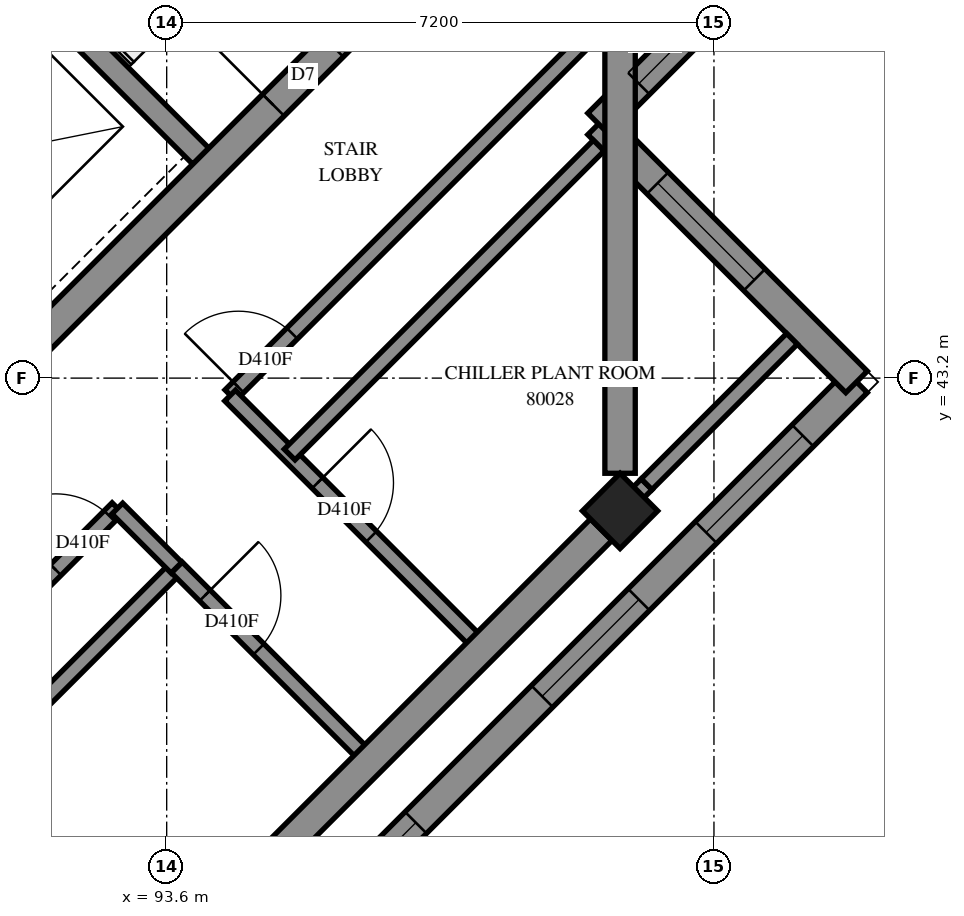
"""IFC4 building model, lengths in metres.
Left out: names, types, materials, properties, quantities, classifications, styles, units other than length and angle.
Written with IfcOpenShell. Run it as: python <this file> out.ifc"""

import sys

from ifc_helpers import new_model, si_unit, direction, frame, frame_2d, origin, origin_2d, place, context, subcontext, project, spatial, polyline, rectangle, outline, extrude, element, fill, save


model = new_model("IFC4")
c1 = context("Model", 3, precision=1e-05, world=origin(), true_north=direction((0.0, 1.0)))
c2 = subcontext(c1, "Body", "Model", "MODEL_VIEW")
j1 = project(units=[si_unit("LENGTHUNIT", "METRE"), si_unit("PLANEANGLEUNIT", "RADIAN")], contexts=[c1])
p1 = place(None, origin())
s1 = spatial("IfcSite", under=j1, at=p1, CompositionType="ELEMENT")
p2 = place(p1, origin())
s2 = spatial("IfcBuilding", under=s1, at=p2, CompositionType="ELEMENT")
p3 = place(p2, frame((0.0, 0.0, 294.4)))
s3 = spatial("IfcBuildingStorey", under=s2, at=p3, CompositionType="ELEMENT", Elevation=294.4)
p4 = place(p3, frame((99.565, 41.453, 0.0), z_axis=(0.0, 0.0, 1.0), x_axis=(0.7071067812, -0.7071067812, 0.0)))
e1 = element("IfcColumn", 1, at=p4, inside=s3, PredefinedType="COLUMN", context=c2, shape_type="SweptSolid", body=[
    extrude(rectangle(XDim=0.7, YDim=0.7, at=origin_2d()), origin(), (0.0, 0.0, 1.0), 3.5),
])
p5 = place(p3, frame((86.978, 38.766, -0.3), z_axis=(0.0, 0.0, 1.0), x_axis=(0.7071067812, 0.7071067812, 0.0)))
e2 = element("IfcWall", 2, at=p5, inside=s3, PredefinedType="SHEAR", context=c2, shape_type="SweptSolid", body=[
    extrude(outline(polyline([(0.0, 0.0), (14.4, 0.0), (14.4, 3.1), (0.0, 3.1), (0.0, 0.0)])), frame((0.0, 0.2, 0.0), z_axis=(0.0, -1.0, 0.0), x_axis=(1.0, 0.0, 0.0)), (0.0, 0.0, 1.0), 0.4),
])
p6 = place(p5, frame((4.55, 0.0, 0.3)))
e3 = element("IfcOpeningElement", 3, at=p6, cuts=e2, PredefinedType="OPENING", context=c2, shape_type="SweptSolid", body=[
    extrude(rectangle(XDim=1.1, YDim=2.1, at=frame_2d((0.55, 1.05))), frame((0.0, 0.21, 0.0), z_axis=(0.0, -1.0, 0.0), x_axis=(1.0, 0.0, 0.0)), (0.0, 0.0, 1.0), 0.42),
])
p7 = place(p5, frame((11.35, 0.0, 0.3)))
e4 = element("IfcOpeningElement", 4, at=p7, cuts=e2, PredefinedType="OPENING", context=c2, shape_type="SweptSolid", body=[
    extrude(rectangle(XDim=1.1, YDim=2.1, at=frame_2d((0.55, 1.05))), frame((0.0, 0.21, 0.0), z_axis=(0.0, -1.0, 0.0), x_axis=(1.0, 0.0, 0.0)), (0.0, 0.0, 1.0), 0.42),
])
p8 = place(p3, frame((88.958, 51.211, 0.0), z_axis=(0.0, 0.0, 1.0), x_axis=(0.7070998367, -0.7071137256, 0.0)))
e5 = element("IfcWall", 5, at=p8, inside=s3, PredefinedType="SOLIDWALL", context=c2, shape_type="SweptSolid", body=[
    extrude(outline(polyline([(0.0, 0.0), (7.2, 0.0), (7.2, 3.5), (0.0, 3.5), (0.0, 0.0)])), frame((0.0, 0.15, 0.0), z_axis=(0.0, -1.0, 0.0), x_axis=(1.0, 0.0, 0.0)), (0.0, 0.0, 1.0), 0.3),
])
p9 = place(p3, frame((89.382, 29.856, 0.0), z_axis=(0.0, 0.0, 1.0), x_axis=(0.7071094407, 0.7071041216, 0.0)))
e6 = element("IfcWall", 6, at=p9, inside=s3, PredefinedType="SOLIDWALL", context=c2, shape_type="SweptSolid", body=[
    extrude(outline(polyline([(-0.2, -0.2), (19.0, -0.2), (18.6, 0.2), (0.2, 0.2), (-0.2, -0.2)])), origin(), (0.0, 0.0, 1.0), 3.5),
])
p10 = place(p9, frame((1.9, 0.0, 0.7)))
e7 = element("IfcOpeningElement", 7, at=p10, cuts=e6, PredefinedType="OPENING", context=c2, shape_type="SweptSolid", body=[
    extrude(rectangle(XDim=1.8, YDim=2.2, at=frame_2d((0.9, 1.1))), frame((0.0, 0.21, 0.0), z_axis=(0.0, -1.0, 0.0), x_axis=(1.0, 0.0, 0.0)), (0.0, 0.0, 1.0), 0.42),
])
p11 = place(p9, frame((5.5, 0.0, 0.7)))
e8 = element("IfcOpeningElement", 8, at=p11, cuts=e6, PredefinedType="OPENING", context=c2, shape_type="SweptSolid", body=[
    extrude(rectangle(XDim=1.8, YDim=2.2, at=frame_2d((0.9, 1.1))), frame((0.0, 0.21, 0.0), z_axis=(0.0, -1.0, 0.0), x_axis=(1.0, 0.0, 0.0)), (0.0, 0.0, 1.0), 0.42),
])
p12 = place(p9, frame((8.8, 0.0, 0.7)))
e9 = element("IfcOpeningElement", 9, at=p12, cuts=e6, PredefinedType="OPENING", context=c2, shape_type="SweptSolid", body=[
    extrude(rectangle(XDim=1.8, YDim=2.2, at=frame_2d((0.9, 1.1))), frame((0.0, 0.21, 0.0), z_axis=(0.0, -1.0, 0.0), x_axis=(1.0, 0.0, 0.0)), (0.0, 0.0, 1.0), 0.42),
])
p13 = place(p9, frame((12.95, 0.0, 0.7)))
e10 = element("IfcOpeningElement", 10, at=p13, cuts=e6, PredefinedType="OPENING", context=c2, shape_type="SweptSolid", body=[
    extrude(rectangle(XDim=1.8, YDim=2.2, at=frame_2d((0.9, 1.1))), frame((0.0, 0.21, 0.0), z_axis=(0.0, -1.0, 0.0), x_axis=(1.0, 0.0, 0.0)), (0.0, 0.0, 1.0), 0.42),
])
p14 = place(p9, frame((16.0, 0.0, 0.7)))
e11 = element("IfcOpeningElement", 11, at=p14, cuts=e6, PredefinedType="OPENING", context=c2, shape_type="SweptSolid", body=[
    extrude(rectangle(XDim=1.8, YDim=2.2, at=frame_2d((0.9, 1.1))), frame((0.0, 0.21, 0.0), z_axis=(0.0, -1.0, 0.0), x_axis=(1.0, 0.0, 0.0)), (0.0, 0.0, 1.0), 0.42),
])
p15 = place(p3, frame((102.676, 43.15, 0.0), z_axis=(0.0, 0.0, 1.0), x_axis=(-0.7070963646, 0.7071171977, 0.0)))
e12 = element("IfcWall", 12, at=p15, inside=s3, PredefinedType="SOLIDWALL", context=c2, shape_type="SweptSolid", body=[
    extrude(outline(polyline([(-0.2, -0.2), (4.6, -0.2), (5.0, 0.2), (0.2, 0.2), (-0.2, -0.2)])), origin(), (0.0, 0.0, 1.0), 3.5),
])
p16 = place(p15, frame((1.9, 0.0, 0.7)))
e13 = element("IfcOpeningElement", 13, at=p16, cuts=e12, PredefinedType="OPENING", context=c2, shape_type="SweptSolid", body=[
    extrude(rectangle(XDim=1.8, YDim=2.2, at=frame_2d((0.9, 1.1))), frame((0.0, 0.21, 0.0), z_axis=(0.0, -1.0, 0.0), x_axis=(1.0, 0.0, 0.0)), (0.0, 0.0, 1.0), 0.42),
])
p17 = place(p3, frame((99.282, 46.544, 0.0), z_axis=(0.0, 0.0, 1.0), x_axis=(0.7071067812, 0.7071067812, 0.0)))
e14 = element("IfcWall", 14, at=p17, inside=s3, PredefinedType="SOLIDWALL", context=c2, shape_type="SweptSolid", body=[
    extrude(outline(polyline([(0.2, -0.2), (6.23, -0.2), (5.657, 0.2), (-0.2, 0.2), (0.2, -0.2)])), origin(), (0.0, 0.0, 1.0), 3.5),
])
p18 = place(p17, frame((0.75, 0.0, 0.7)))
e15 = element("IfcOpeningElement", 15, at=p18, cuts=e14, PredefinedType="OPENING", context=c2, shape_type="SweptSolid", body=[
    extrude(rectangle(XDim=1.8, YDim=2.2, at=frame_2d((0.9, 1.1))), frame((0.0, 0.21, 0.0), z_axis=(0.0, -1.0, 0.0), x_axis=(1.0, 0.0, 0.0)), (0.0, 0.0, 1.0), 0.42),
])
p19 = place(p3, frame((93.908, 34.665, 0.0), z_axis=(0.0, 0.0, 1.0), x_axis=(-0.7071067812, 0.7071067812, 0.0)))
e16 = element("IfcWall", 16, at=p19, inside=s3, PredefinedType="PARAPET", context=c2, shape_type="SweptSolid", body=[
    extrude(outline(polyline([(0.0, -0.1), (7.3, -0.1), (7.3, 0.1), (0.0, 0.1), (0.0, -0.1)])), origin(), (0.0, 0.0, 1.0), 0.25),
])
p20 = place(p3, frame((86.836, 35.372, 0.0), z_axis=(0.0, 0.0, 1.0), x_axis=(0.7071067812, 0.7071067812, 0.0)))
e17 = element("IfcWall", 17, at=p20, inside=s3, PredefinedType="PARTITIONING", context=c2, shape_type="SweptSolid", body=[
    extrude(rectangle(XDim=8.651, YDim=0.2, at=frame_2d((4.325, 0.0))), origin(), (0.0, 0.0, 1.0), 3.5),
])
p21 = place(p20, frame((7.502, 0.0, 0.0)))
e18 = element("IfcOpeningElement", 18, at=p21, cuts=e17, PredefinedType="OPENING", context=c2, shape_type="SweptSolid", body=[
    extrude(rectangle(XDim=1.0, YDim=2.1, at=frame_2d((0.5, 1.05))), frame((0.0, 0.11, 0.0), z_axis=(0.0, -1.0, 0.0), x_axis=(1.0, 0.0, 0.0)), (0.0, 0.0, 1.0), 0.22),
])
p22 = place(p3, frame((94.438, 42.974, 0.0), z_axis=(0.0, 0.0, 1.0), x_axis=(0.7071067812, 0.7071067812, 0.0)))
e19 = element("IfcWall", 19, at=p22, inside=s3, PredefinedType="PARTITIONING", context=c2, shape_type="SweptSolid", body=[
    extrude(rectangle(XDim=8.649, YDim=0.2, at=frame_2d((4.325, 0.0))), origin(), (0.0, 0.0, 1.0), 3.5),
])
p23 = place(p22, frame((0.15, 0.0, 0.0)))
e20 = element("IfcOpeningElement", 20, at=p23, cuts=e19, PredefinedType="OPENING", context=c2, shape_type="SweptSolid", body=[
    extrude(rectangle(XDim=1.0, YDim=2.1, at=frame_2d((0.5, 1.05))), frame((0.0, 0.11, 0.0), z_axis=(0.0, -1.0, 0.0), x_axis=(1.0, 0.0, 0.0)), (0.0, 0.0, 1.0), 0.22),
])
p24 = place(p3, frame((89.876, 36.858, 0.0), z_axis=(0.0, 0.0, 1.0), x_axis=(0.7071067812, 0.7071067812, 0.0)))
e21 = element("IfcWall", 21, at=p24, inside=s3, PredefinedType="PARTITIONING", context=c2, shape_type="SweptSolid", body=[
    extrude(rectangle(XDim=5.45, YDim=0.2, at=frame_2d((2.725, 0.0))), origin(), (0.0, 0.0, 1.0), 3.5),
])
p25 = place(p3, frame((94.434, 42.971, 0.0), z_axis=(0.0, 0.0, 1.0), x_axis=(0.7071067812, -0.7071067812, 0.0)))
e22 = element("IfcWall", 22, at=p25, inside=s3, PredefinedType="PARTITIONING", context=c2, shape_type="SweptSolid", body=[
    extrude(rectangle(XDim=4.701, YDim=0.2, at=frame_2d((2.35, 0.0))), origin(), (0.0, 0.0, 1.0), 3.5),
])
p26 = place(p25, frame((1.626, 0.0, 0.0)))
e23 = element("IfcOpeningElement", 23, at=p26, cuts=e22, PredefinedType="OPENING", context=c2, shape_type="SweptSolid", body=[
    extrude(rectangle(XDim=1.0, YDim=2.1, at=frame_2d((0.5, 1.05))), frame((0.0, 0.11, 0.0), z_axis=(0.0, -1.0, 0.0), x_axis=(1.0, 0.0, 0.0)), (0.0, 0.0, 1.0), 0.22),
])
p27 = place(p3, frame((93.732, 40.71, 0.0), z_axis=(0.0, 0.0, 1.0), x_axis=(0.7068288851, -0.7073845681, 0.0)))
e24 = element("IfcWall", 24, at=p27, inside=s3, PredefinedType="PARTITIONING", context=c2, shape_type="SweptSolid", body=[
    extrude(rectangle(XDim=3.599, YDim=0.2, at=frame_2d((1.8, 0.0))), origin(), (0.0, 0.0, 1.0), 3.5),
])
p28 = place(p27, frame((0.524, 0.0, 0.0)))
e25 = element("IfcOpeningElement", 25, at=p28, cuts=e24, PredefinedType="OPENING", context=c2, shape_type="SweptSolid", body=[
    extrude(rectangle(XDim=1.0, YDim=2.1, at=frame_2d((0.5, 1.05))), frame((0.0, 0.11, 0.0), z_axis=(0.0, -1.0, 0.0), x_axis=(1.0, 0.0, 0.0)), (0.0, 0.0, 1.0), 0.22),
])
p29 = place(p3, frame((96.275, 38.165, 0.0), z_axis=(0.0, 0.0, 1.0), x_axis=(0.7071067812, 0.7071067812, 0.0)))
e26 = element("IfcWall", 26, at=p29, inside=s3, PredefinedType="PARTITIONING", context=c2, shape_type="SweptSolid", body=[
    extrude(rectangle(XDim=2.102, YDim=0.2, at=frame_2d((1.051, 0.0))), origin(), (0.0, 0.0, 1.0), 3.0),
])
p30 = place(p3, frame((97.763, 39.649, 0.0), z_axis=(0.0, 0.0, 1.0), x_axis=(0.7066468317, 0.7075664316, 0.0)))
e27 = element("IfcWall", 27, at=p30, inside=s3, PredefinedType="PARTITIONING", context=c2, shape_type="SweptSolid", body=[
    extrude(rectangle(XDim=3.045, YDim=0.2, at=frame_2d((1.522, 0.0))), origin(), (0.0, 0.0, 1.0), 3.0),
])
p31 = place(p3, frame((94.823, 36.713, 0.0), z_axis=(0.0, 0.0, 1.0), x_axis=(0.7071067812, 0.7071067812, 0.0)))
e28 = element("IfcWall", 28, at=p31, inside=s3, PredefinedType="PARTITIONING", context=c2, shape_type="SweptSolid", body=[
    extrude(rectangle(XDim=2.053, YDim=0.2, at=frame_2d((1.027, 0.0))), origin(), (0.0, 0.0, 1.0), 3.0),
])
p32 = place(p3, frame((92.951, 41.485, 0.0), z_axis=(0.0, 0.0, 1.0), x_axis=(0.7071067812, -0.7071067812, 0.0)))
e29 = element("IfcWall", 29, at=p32, inside=s3, PredefinedType="PARTITIONING", context=c2, shape_type="SweptSolid", body=[
    extrude(rectangle(XDim=1.1, YDim=0.2, at=frame_2d((0.55, 0.0))), origin(), (0.0, 0.0, 1.0), 3.5),
])
p33 = place(p3, frame((92.624, 35.171, 0.0), z_axis=(0.0, 0.0, 1.0), x_axis=(-0.7071067812, 0.7071067812, 0.0)))
e30 = element("IfcWall", 30, at=p33, inside=s3, PredefinedType="SOLIDWALL", context=c2, shape_type="SweptSolid", body=[
    extrude(outline(polyline([(0.0, -0.3), (2.635, -0.3), (2.635, 0.3), (0.0, 0.3), (0.0, -0.3)])), origin(), (0.0, 0.0, 1.0), 0.65),
])
p34 = place(p3, frame((95.217, 42.195, 0.0), z_axis=(0.0, 0.0, 1.0), x_axis=(0.7072806841, 0.7069328355, 0.0)))
e31 = element("IfcWall", 31, at=p34, inside=s3, PredefinedType="PARTITIONING", context=c2, shape_type="SweptSolid", body=[
    extrude(outline(polyline([(0.0, -0.1), (5.75, -0.1), (5.75, 0.1), (0.0, 0.1), (0.0, -0.1)])), origin(), (0.0, 0.0, 1.0), 3.5),
])
p35 = place(p3, frame((99.914, 41.804, 0.0), z_axis=(0.0, 0.0, 1.0), x_axis=(0.7071067812, 0.7071067812, 0.0)))
e32 = element("IfcWall", 32, at=p35, inside=s3, PredefinedType="PARTITIONING", context=c2, shape_type="SweptSolid", body=[
    extrude(outline(polyline([(0.0, -0.1), (2.705, -0.1), (2.705, 0.1), (0.0, 0.1), (0.0, -0.1)])), origin(), (0.0, 0.0, 1.0), 3.5),
])
p36 = place(p12, origin())
e33 = element("IfcWindow", 33, at=p36, inside=s3, PartitioningType="SINGLE_PANEL", PredefinedType="WINDOW", context=c2, shape_type="SweptSolid", body=[
    extrude(rectangle(XDim=1.8, YDim=2.2, at=frame_2d((0.9, 1.1))), frame((0.0, 0.08, 0.0), z_axis=(0.0, -1.0, 0.0), x_axis=(1.0, 0.0, 0.0)), (0.0, 0.0, 1.0), 0.06),
])
fill(e9, e33)
p37 = place(p13, origin())
e34 = element("IfcWindow", 34, at=p37, inside=s3, PartitioningType="SINGLE_PANEL", PredefinedType="WINDOW", context=c2, shape_type="SweptSolid", body=[
    extrude(rectangle(XDim=1.8, YDim=2.2, at=frame_2d((0.9, 1.1))), frame((0.0, 0.08, 0.0), z_axis=(0.0, -1.0, 0.0), x_axis=(1.0, 0.0, 0.0)), (0.0, 0.0, 1.0), 0.06),
])
fill(e10, e34)
p38 = place(p14, origin())
e35 = element("IfcWindow", 35, at=p38, inside=s3, PartitioningType="SINGLE_PANEL", PredefinedType="WINDOW", context=c2, shape_type="SweptSolid", body=[
    extrude(rectangle(XDim=1.8, YDim=2.2, at=frame_2d((0.9, 1.1))), frame((0.0, 0.08, 0.0), z_axis=(0.0, -1.0, 0.0), x_axis=(1.0, 0.0, 0.0)), (0.0, 0.0, 1.0), 0.06),
])
fill(e11, e35)
p39 = place(p16, origin())
e36 = element("IfcWindow", 36, at=p39, inside=s3, PartitioningType="SINGLE_PANEL", PredefinedType="WINDOW", context=c2, shape_type="SweptSolid", body=[
    extrude(rectangle(XDim=1.8, YDim=2.2, at=frame_2d((0.9, 1.1))), frame((0.0, 0.08, 0.0), z_axis=(0.0, -1.0, 0.0), x_axis=(1.0, 0.0, 0.0)), (0.0, 0.0, 1.0), 0.06),
])
fill(e13, e36)
p40 = place(p18, origin())
e37 = element("IfcWindow", 37, at=p40, inside=s3, PartitioningType="SINGLE_PANEL", PredefinedType="WINDOW", context=c2, shape_type="SweptSolid", body=[
    extrude(rectangle(XDim=1.8, YDim=2.2, at=frame_2d((0.9, 1.1))), frame((0.0, 0.08, 0.0), z_axis=(0.0, -1.0, 0.0), x_axis=(1.0, 0.0, 0.0)), (0.0, 0.0, 1.0), 0.06),
])
fill(e15, e37)
p41 = place(p7, origin())
e38 = element("IfcDoor", 38, at=p41, inside=s3, OperationType="SINGLE_SWING_RIGHT", PredefinedType="DOOR", context=c2, shape_type="SweptSolid", body=[
    extrude(rectangle(XDim=1.1, YDim=2.1, at=frame_2d((0.55, 1.05))), frame((0.0, 0.025, 0.0), z_axis=(0.0, -1.0, 0.0), x_axis=(1.0, 0.0, 0.0)), (0.0, 0.0, 1.0), 0.05),
])
fill(e4, e38)
p42 = place(p23, origin())
e39 = element("IfcDoor", 39, at=p42, inside=s3, OperationType="SINGLE_SWING_LEFT", PredefinedType="DOOR", context=c2, shape_type="SweptSolid", body=[
    extrude(rectangle(XDim=1.0, YDim=2.1, at=frame_2d((0.5, 1.05))), frame((0.0, 0.025, 0.0), z_axis=(0.0, -1.0, 0.0), x_axis=(1.0, 0.0, 0.0)), (0.0, 0.0, 1.0), 0.05),
])
fill(e20, e39)
p43 = place(p21, origin())
e40 = element("IfcDoor", 40, at=p43, inside=s3, OperationType="SINGLE_SWING_LEFT", PredefinedType="DOOR", context=c2, shape_type="SweptSolid", body=[
    extrude(rectangle(XDim=1.0, YDim=2.1, at=frame_2d((0.5, 1.05))), frame((0.0, 0.025, 0.0), z_axis=(0.0, -1.0, 0.0), x_axis=(1.0, 0.0, 0.0)), (0.0, 0.0, 1.0), 0.05),
])
fill(e18, e40)
p44 = place(p28, origin())
e41 = element("IfcDoor", 41, at=p44, inside=s3, OperationType="SINGLE_SWING_LEFT", PredefinedType="DOOR", context=c2, shape_type="SweptSolid", body=[
    extrude(rectangle(XDim=1.0, YDim=2.1, at=frame_2d((0.5, 1.05))), frame((0.0, 0.025, 0.0), z_axis=(0.0, -1.0, 0.0), x_axis=(1.0, 0.0, 0.0)), (0.0, 0.0, 1.0), 0.05),
])
fill(e25, e41)
p45 = place(p26, origin())
e42 = element("IfcDoor", 42, at=p45, inside=s3, OperationType="SINGLE_SWING_RIGHT", PredefinedType="DOOR", context=c2, shape_type="SweptSolid", body=[
    extrude(rectangle(XDim=1.0, YDim=2.1, at=frame_2d((0.5, 1.05))), frame((0.0, 0.025, 0.0), z_axis=(0.0, -1.0, 0.0), x_axis=(1.0, 0.0, 0.0)), (0.0, 0.0, 1.0), 0.05),
])
fill(e23, e42)
save(model, sys.argv[1])
